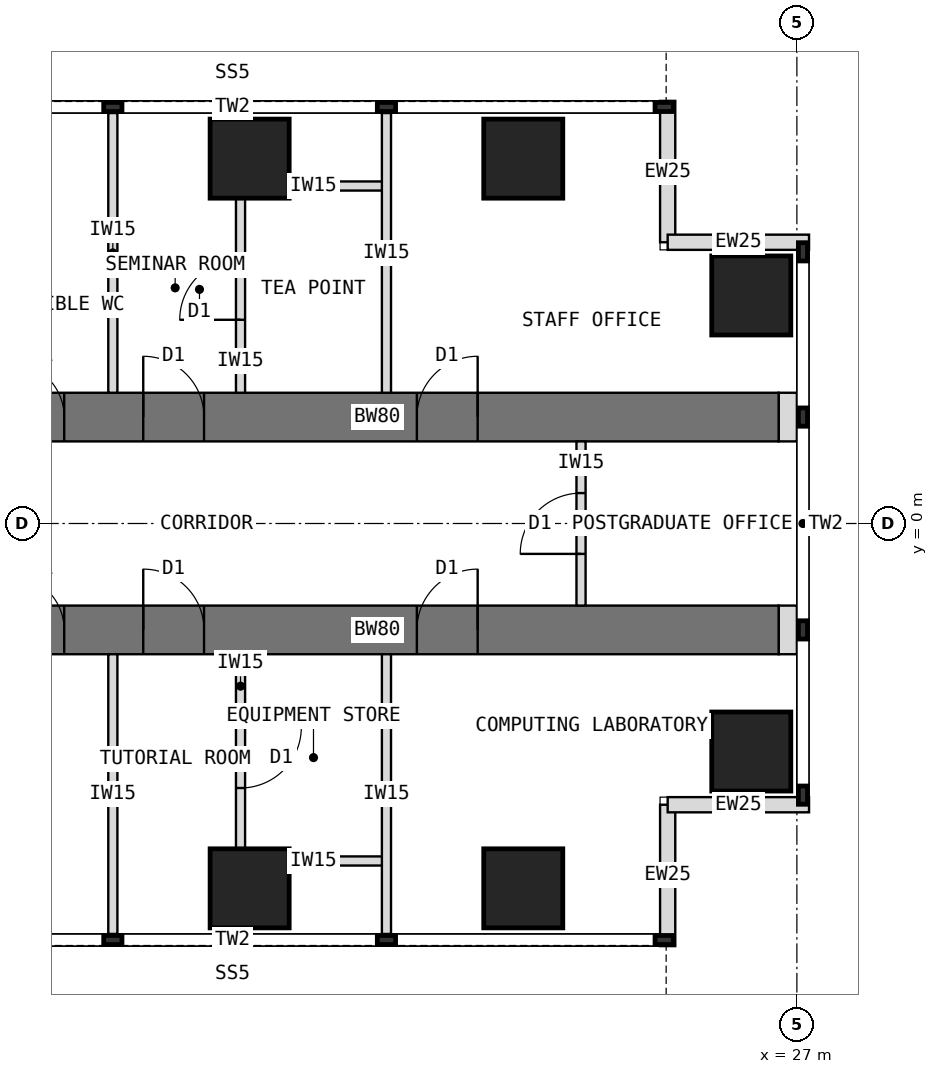
"""IFC4 building model, lengths in metres.
Left out: names, types, materials, properties, quantities, classifications, styles, units other than length and angle.
Written with IfcOpenShell. Run it as: python <this file> out.ifc"""

import sys

from ifc_helpers import new_model, si_unit, direction, frame, frame_2d, origin, origin_2d, place, context, subcontext, project, spatial, rectangle, extrude, element, fill, save


model = new_model("IFC4")
c1 = context("Model", 3, precision=1e-05, world=origin(), true_north=direction((0.0, 1.0)))
c2 = subcontext(c1, "Body", "Model", "MODEL_VIEW")
j1 = project(units=[si_unit("LENGTHUNIT", "METRE"), si_unit("PLANEANGLEUNIT", "RADIAN")], contexts=[c1])
p1 = place(None, origin())
s1 = spatial("IfcSite", under=j1, at=p1, CompositionType="ELEMENT")
p2 = place(p1, origin())
s2 = spatial("IfcBuilding", under=s1, at=p2, CompositionType="ELEMENT")
p3 = place(p2, frame((0.0, 0.0, 133.5)))
s3 = spatial("IfcBuildingStorey", under=s2, at=p3, CompositionType="ELEMENT", Elevation=133.5)
p4 = place(p3, frame((13.5, 1.75, 0.0), z_axis=(0.0, 0.0, 1.0), x_axis=(1.0, 0.0, 0.0)))
e1 = element("IfcWall", 1, at=p4, inside=s3, PredefinedType="SHEAR", context=c2, shape_type="SweptSolid", body=[
    extrude(rectangle(XDim=13.2, YDim=0.8, at=frame_2d((6.6, 0.0))), origin(), (0.0, 0.0, 1.0), 4.0),
])
p5 = place(p4, frame((0.55, 0.0, 0.0)))
e2 = element("IfcOpeningElement", 2, at=p5, cuts=e1, PredefinedType="OPENING", context=c2, shape_type="SweptSolid", body=[
    extrude(rectangle(XDim=0.9, YDim=2.1, at=frame_2d((0.45, 1.05))), frame((0.0, 0.41, 0.0), z_axis=(0.0, -1.0, 0.0), x_axis=(1.0, 0.0, 0.0)), (0.0, 0.0, 1.0), 0.82),
])
p6 = place(p4, frame((2.75, 0.0, 0.0)))
e3 = element("IfcOpeningElement", 3, at=p6, cuts=e1, PredefinedType="OPENING", context=c2, shape_type="SweptSolid", body=[
    extrude(rectangle(XDim=1.0, YDim=2.1, at=frame_2d((0.5, 1.05))), frame((0.0, 0.41, 0.0), z_axis=(0.0, -1.0, 0.0), x_axis=(1.0, 0.0, 0.0)), (0.0, 0.0, 1.0), 0.82),
])
p7 = place(p4, frame((7.25, 0.0, 0.0)))
e4 = element("IfcOpeningElement", 4, at=p7, cuts=e1, PredefinedType="OPENING", context=c2, shape_type="SweptSolid", body=[
    extrude(rectangle(XDim=1.0, YDim=2.1, at=frame_2d((0.5, 1.05))), frame((0.0, 0.41, 0.0), z_axis=(0.0, -1.0, 0.0), x_axis=(1.0, 0.0, 0.0)), (0.0, 0.0, 1.0), 0.82),
])
p8 = place(p3, frame((13.5, -1.75, 0.0), z_axis=(0.0, 0.0, 1.0), x_axis=(1.0, 0.0, 0.0)))
e5 = element("IfcWall", 5, at=p8, inside=s3, PredefinedType="SHEAR", context=c2, shape_type="SweptSolid", body=[
    extrude(rectangle(XDim=13.2, YDim=0.8, at=frame_2d((6.6, 0.0))), origin(), (0.0, 0.0, 1.0), 4.0),
])
p9 = place(p8, frame((0.55, 0.0, 0.0)))
e6 = element("IfcOpeningElement", 6, at=p9, cuts=e5, PredefinedType="OPENING", context=c2, shape_type="SweptSolid", body=[
    extrude(rectangle(XDim=0.9, YDim=2.1, at=frame_2d((0.45, 1.05))), frame((0.0, 0.41, 0.0), z_axis=(0.0, -1.0, 0.0), x_axis=(1.0, 0.0, 0.0)), (0.0, 0.0, 1.0), 0.82),
])
p10 = place(p8, frame((2.75, 0.0, 0.0)))
e7 = element("IfcOpeningElement", 7, at=p10, cuts=e5, PredefinedType="OPENING", context=c2, shape_type="SweptSolid", body=[
    extrude(rectangle(XDim=1.0, YDim=2.1, at=frame_2d((0.5, 1.05))), frame((0.0, 0.41, 0.0), z_axis=(0.0, -1.0, 0.0), x_axis=(1.0, 0.0, 0.0)), (0.0, 0.0, 1.0), 0.82),
])
p11 = place(p8, frame((7.25, 0.0, 0.0)))
e8 = element("IfcOpeningElement", 8, at=p11, cuts=e5, PredefinedType="OPENING", context=c2, shape_type="SweptSolid", body=[
    extrude(rectangle(XDim=1.0, YDim=2.1, at=frame_2d((0.5, 1.05))), frame((0.0, 0.41, 0.0), z_axis=(0.0, -1.0, 0.0), x_axis=(1.0, 0.0, 0.0)), (0.0, 0.0, 1.0), 0.82),
])
for number, where, z_axis, x_axis in (
    (9, (18.0, 6.0, 0.0), (0.0, 0.0, 1.0), (1.0, 0.0, 0.0)),
    (10, (18.0, -6.0, 0.0), (0.0, 0.0, 1.0), (1.0, 0.0, 0.0)),
    (11, (22.5, 6.0, 0.0), (0.0, 0.0, 1.0), (1.0, 0.0, 0.0)),
    (12, (22.5, -6.0, 0.0), (0.0, 0.0, 1.0), (1.0, 0.0, 0.0)),
    (13, (26.25, 3.75, 0.0), (0.0, 0.0, 1.0), (1.0, 0.0, 0.0)),
    (14, (26.25, -3.75, 0.0), (0.0, 0.0, 1.0), (1.0, 0.0, 0.0)),
):
    element("IfcColumn", number, at=place(p3, frame(where, z_axis=z_axis, x_axis=x_axis)), inside=s3, PredefinedType="COLUMN", context=c2, shape_type="SweptSolid", body=[
        extrude(rectangle(XDim=1.3, YDim=1.3, at=origin_2d()), origin(), (0.0, 0.0, 1.0), 4.0),
    ])
for number, where, z_axis, x_axis in (
    (15, (24.875, 6.95, 0.0), (0.0, 0.0, 1.0), (0.0, -1.0, 0.0)),
    (16, (24.875, 4.625, 0.0), (0.0, 0.0, 1.0), (1.0, 0.0, 0.0)),
    (17, (24.875, -6.95, 0.0), (0.0, 0.0, 1.0), (0.0, 1.0, 0.0)),
    (18, (24.875, -4.625, 0.0), (0.0, 0.0, 1.0), (1.0, 0.0, 0.0)),
):
    element("IfcWall", number, at=place(p3, frame(where, z_axis=z_axis, x_axis=x_axis)), inside=s3, PredefinedType="STANDARD", context=c2, shape_type="SweptSolid", body=[
        extrude(rectangle(XDim=2.325, YDim=0.25, at=frame_2d((1.163, 0.0))), origin(), (0.0, 0.0, 1.0), 3.8),
    ])
for number, where, z_axis, x_axis in (
    (19, (26.7, 1.75, 0.0), (0.0, 0.0, 1.0), (1.0, 0.0, 0.0)),
    (20, (26.7, -1.75, 0.0), (0.0, 0.0, 1.0), (1.0, 0.0, 0.0)),
):
    element("IfcWall", number, at=place(p3, frame(where, z_axis=z_axis, x_axis=x_axis)), inside=s3, PredefinedType="PARTITIONING", context=c2, shape_type="SweptSolid", body=[
        extrude(rectangle(XDim=0.3, YDim=0.8, at=frame_2d((0.15, 0.0))), origin(), (0.0, 0.0, 1.0), 3.8),
    ])
for number, where, z_axis, x_axis in (
    (21, (15.75, 2.15, 0.0), (0.0, 0.0, 1.0), (0.0, 1.0, 0.0)),
    (22, (20.25, 2.15, 0.0), (0.0, 0.0, 1.0), (0.0, 1.0, 0.0)),
):
    element("IfcWall", number, at=place(p3, frame(where, z_axis=z_axis, x_axis=x_axis)), inside=s3, PredefinedType="PARTITIONING", context=c2, shape_type="SweptSolid", body=[
        extrude(rectangle(XDim=4.6, YDim=0.15, at=frame_2d((2.3, 0.0))), origin(), (0.0, 0.0, 1.0), 3.8),
    ])
p12 = place(p3, frame((17.85, 5.55, 0.0), z_axis=(0.0, 0.0, 1.0), x_axis=(1.0, 0.0, 0.0)))
e23 = element("IfcWall", 23, at=p12, inside=s3, PredefinedType="PARTITIONING", context=c2, shape_type="SweptSolid", body=[
    extrude(rectangle(XDim=2.4, YDim=0.15, at=frame_2d((1.2, 0.0))), origin(), (0.0, 0.0, 1.0), 3.8),
])
p13 = place(p3, frame((17.85, 2.15, 0.0), z_axis=(0.0, 0.0, 1.0), x_axis=(0.0, 1.0, 0.0)))
e24 = element("IfcWall", 24, at=p13, inside=s3, PredefinedType="PARTITIONING", context=c2, shape_type="SweptSolid", body=[
    extrude(rectangle(XDim=3.4, YDim=0.15, at=frame_2d((1.7, 0.0))), origin(), (0.0, 0.0, 1.0), 3.8),
])
p14 = place(p13, frame((1.2, 0.0, 0.0)))
e25 = element("IfcOpeningElement", 25, at=p14, cuts=e24, PredefinedType="OPENING", context=c2, shape_type="SweptSolid", body=[
    extrude(rectangle(XDim=1.0, YDim=2.1, at=frame_2d((0.5, 1.05))), frame((0.0, 0.085, 0.0), z_axis=(0.0, -1.0, 0.0), x_axis=(1.0, 0.0, 0.0)), (0.0, 0.0, 1.0), 0.17),
])
for number, where, z_axis, x_axis in (
    (26, (15.75, -2.15, 0.0), (0.0, 0.0, 1.0), (0.0, -1.0, 0.0)),
    (27, (20.25, -2.15, 0.0), (0.0, 0.0, 1.0), (0.0, -1.0, 0.0)),
):
    element("IfcWall", number, at=place(p3, frame(where, z_axis=z_axis, x_axis=x_axis)), inside=s3, PredefinedType="PARTITIONING", context=c2, shape_type="SweptSolid", body=[
        extrude(rectangle(XDim=4.6, YDim=0.15, at=frame_2d((2.3, 0.0))), origin(), (0.0, 0.0, 1.0), 3.8),
    ])
p15 = place(p3, frame((17.85, -5.55, 0.0), z_axis=(0.0, 0.0, 1.0), x_axis=(1.0, 0.0, 0.0)))
e28 = element("IfcWall", 28, at=p15, inside=s3, PredefinedType="PARTITIONING", context=c2, shape_type="SweptSolid", body=[
    extrude(rectangle(XDim=2.4, YDim=0.15, at=frame_2d((1.2, 0.0))), origin(), (0.0, 0.0, 1.0), 3.8),
])
p16 = place(p3, frame((17.85, -2.15, 0.0), z_axis=(0.0, 0.0, 1.0), x_axis=(0.0, -1.0, 0.0)))
e29 = element("IfcWall", 29, at=p16, inside=s3, PredefinedType="PARTITIONING", context=c2, shape_type="SweptSolid", body=[
    extrude(rectangle(XDim=3.4, YDim=0.15, at=frame_2d((1.7, 0.0))), origin(), (0.0, 0.0, 1.0), 3.8),
])
p17 = place(p16, frame((1.2, 0.0, 0.0)))
e30 = element("IfcOpeningElement", 30, at=p17, cuts=e29, PredefinedType="OPENING", context=c2, shape_type="SweptSolid", body=[
    extrude(rectangle(XDim=1.0, YDim=2.1, at=frame_2d((0.5, 1.05))), frame((0.0, 0.085, 0.0), z_axis=(0.0, -1.0, 0.0), x_axis=(1.0, 0.0, 0.0)), (0.0, 0.0, 1.0), 0.17),
])
p18 = place(p3, frame((23.45, -1.35, 0.0), z_axis=(0.0, 0.0, 1.0), x_axis=(0.0, 1.0, 0.0)))
e31 = element("IfcWall", 31, at=p18, inside=s3, PredefinedType="PARTITIONING", context=c2, shape_type="SweptSolid", body=[
    extrude(rectangle(XDim=2.7, YDim=0.15, at=frame_2d((1.35, 0.0))), origin(), (0.0, 0.0, 1.0), 3.8),
])
p19 = place(p18, frame((0.85, 0.0, 0.0)))
e32 = element("IfcOpeningElement", 32, at=p19, cuts=e31, PredefinedType="OPENING", context=c2, shape_type="SweptSolid", body=[
    extrude(rectangle(XDim=1.0, YDim=2.1, at=frame_2d((0.5, 1.05))), frame((0.0, 0.085, 0.0), z_axis=(0.0, -1.0, 0.0), x_axis=(1.0, 0.0, 0.0)), (0.0, 0.0, 1.0), 0.17),
])
p20 = place(p14, origin())
e33 = element("IfcDoor", 33, at=p20, inside=s3, OperationType="SINGLE_SWING_LEFT", PredefinedType="DOOR", context=c2, shape_type="SweptSolid", body=[
    extrude(rectangle(XDim=1.0, YDim=2.1, at=frame_2d((0.5, 1.05))), frame((0.0, 0.025, 0.0), z_axis=(0.0, -1.0, 0.0), x_axis=(1.0, 0.0, 0.0)), (0.0, 0.0, 1.0), 0.05),
])
fill(e25, e33)
p21 = place(p17, origin())
e34 = element("IfcDoor", 34, at=p21, inside=s3, OperationType="SINGLE_SWING_LEFT", PredefinedType="DOOR", context=c2, shape_type="SweptSolid", body=[
    extrude(rectangle(XDim=1.0, YDim=2.1, at=frame_2d((0.5, 1.05))), frame((0.0, 0.025, 0.0), z_axis=(0.0, -1.0, 0.0), x_axis=(1.0, 0.0, 0.0)), (0.0, 0.0, 1.0), 0.05),
])
fill(e30, e34)
p22 = place(p19, origin())
e35 = element("IfcDoor", 35, at=p22, inside=s3, OperationType="SINGLE_SWING_LEFT", PredefinedType="DOOR", context=c2, shape_type="SweptSolid", body=[
    extrude(rectangle(XDim=1.0, YDim=2.1, at=frame_2d((0.5, 1.05))), frame((0.0, 0.025, 0.0), z_axis=(0.0, -1.0, 0.0), x_axis=(1.0, 0.0, 0.0)), (0.0, 0.0, 1.0), 0.05),
])
fill(e32, e35)
p23 = place(p5, origin())
e36 = element("IfcDoor", 36, at=p23, inside=s3, OperationType="SINGLE_SWING_LEFT", PredefinedType="DOOR", context=c2, shape_type="SweptSolid", body=[
    extrude(rectangle(XDim=0.82, YDim=2.06, at=frame_2d((0.45, 1.03))), frame((0.0, 0.025, 0.0), z_axis=(0.0, -1.0, 0.0), x_axis=(1.0, 0.0, 0.0)), (0.0, 0.0, 1.0), 0.05),
    extrude(rectangle(XDim=0.04, YDim=2.1, at=frame_2d((0.02, 1.05))), frame((0.0, 0.4, 0.0), z_axis=(0.0, -1.0, 0.0), x_axis=(1.0, 0.0, 0.0)), (0.0, 0.0, 1.0), 0.8),
    extrude(rectangle(XDim=0.04, YDim=2.1, at=frame_2d((0.88, 1.05))), frame((0.0, 0.4, 0.0), z_axis=(0.0, -1.0, 0.0), x_axis=(1.0, 0.0, 0.0)), (0.0, 0.0, 1.0), 0.8),
    extrude(rectangle(XDim=0.82, YDim=0.04, at=frame_2d((0.45, 2.08))), frame((0.0, 0.4, 0.0), z_axis=(0.0, -1.0, 0.0), x_axis=(1.0, 0.0, 0.0)), (0.0, 0.0, 1.0), 0.8),
])
fill(e2, e36)
p24 = place(p6, origin())
e37 = element("IfcDoor", 37, at=p24, inside=s3, OperationType="SINGLE_SWING_LEFT", PredefinedType="DOOR", context=c2, shape_type="SweptSolid", body=[
    extrude(rectangle(XDim=0.92, YDim=2.06, at=frame_2d((0.5, 1.03))), frame((0.0, 0.025, 0.0), z_axis=(0.0, -1.0, 0.0), x_axis=(1.0, 0.0, 0.0)), (0.0, 0.0, 1.0), 0.05),
    extrude(rectangle(XDim=0.04, YDim=2.1, at=frame_2d((0.02, 1.05))), frame((0.0, 0.4, 0.0), z_axis=(0.0, -1.0, 0.0), x_axis=(1.0, 0.0, 0.0)), (0.0, 0.0, 1.0), 0.8),
    extrude(rectangle(XDim=0.04, YDim=2.1, at=frame_2d((0.98, 1.05))), frame((0.0, 0.4, 0.0), z_axis=(0.0, -1.0, 0.0), x_axis=(1.0, 0.0, 0.0)), (0.0, 0.0, 1.0), 0.8),
    extrude(rectangle(XDim=0.92, YDim=0.04, at=frame_2d((0.5, 2.08))), frame((0.0, 0.4, 0.0), z_axis=(0.0, -1.0, 0.0), x_axis=(1.0, 0.0, 0.0)), (0.0, 0.0, 1.0), 0.8),
])
fill(e3, e37)
p25 = place(p7, origin())
e38 = element("IfcDoor", 38, at=p25, inside=s3, OperationType="SINGLE_SWING_RIGHT", PredefinedType="DOOR", context=c2, shape_type="SweptSolid", body=[
    extrude(rectangle(XDim=0.92, YDim=2.06, at=frame_2d((0.5, 1.03))), frame((0.0, 0.025, 0.0), z_axis=(0.0, -1.0, 0.0), x_axis=(1.0, 0.0, 0.0)), (0.0, 0.0, 1.0), 0.05),
    extrude(rectangle(XDim=0.04, YDim=2.1, at=frame_2d((0.02, 1.05))), frame((0.0, 0.4, 0.0), z_axis=(0.0, -1.0, 0.0), x_axis=(1.0, 0.0, 0.0)), (0.0, 0.0, 1.0), 0.8),
    extrude(rectangle(XDim=0.04, YDim=2.1, at=frame_2d((0.98, 1.05))), frame((0.0, 0.4, 0.0), z_axis=(0.0, -1.0, 0.0), x_axis=(1.0, 0.0, 0.0)), (0.0, 0.0, 1.0), 0.8),
    extrude(rectangle(XDim=0.92, YDim=0.04, at=frame_2d((0.5, 2.08))), frame((0.0, 0.4, 0.0), z_axis=(0.0, -1.0, 0.0), x_axis=(1.0, 0.0, 0.0)), (0.0, 0.0, 1.0), 0.8),
])
fill(e4, e38)
p26 = place(p9, origin())
e39 = element("IfcDoor", 39, at=p26, inside=s3, OperationType="SINGLE_SWING_LEFT", PredefinedType="DOOR", context=c2, shape_type="SweptSolid", body=[
    extrude(rectangle(XDim=0.82, YDim=2.06, at=frame_2d((0.45, 1.03))), frame((0.0, 0.025, 0.0), z_axis=(0.0, -1.0, 0.0), x_axis=(1.0, 0.0, 0.0)), (0.0, 0.0, 1.0), 0.05),
    extrude(rectangle(XDim=0.04, YDim=2.1, at=frame_2d((0.02, 1.05))), frame((0.0, 0.4, 0.0), z_axis=(0.0, -1.0, 0.0), x_axis=(1.0, 0.0, 0.0)), (0.0, 0.0, 1.0), 0.8),
    extrude(rectangle(XDim=0.04, YDim=2.1, at=frame_2d((0.88, 1.05))), frame((0.0, 0.4, 0.0), z_axis=(0.0, -1.0, 0.0), x_axis=(1.0, 0.0, 0.0)), (0.0, 0.0, 1.0), 0.8),
    extrude(rectangle(XDim=0.82, YDim=0.04, at=frame_2d((0.45, 2.08))), frame((0.0, 0.4, 0.0), z_axis=(0.0, -1.0, 0.0), x_axis=(1.0, 0.0, 0.0)), (0.0, 0.0, 1.0), 0.8),
])
fill(e6, e39)
p27 = place(p10, origin())
e40 = element("IfcDoor", 40, at=p27, inside=s3, OperationType="SINGLE_SWING_LEFT", PredefinedType="DOOR", context=c2, shape_type="SweptSolid", body=[
    extrude(rectangle(XDim=0.92, YDim=2.06, at=frame_2d((0.5, 1.03))), frame((0.0, 0.025, 0.0), z_axis=(0.0, -1.0, 0.0), x_axis=(1.0, 0.0, 0.0)), (0.0, 0.0, 1.0), 0.05),
    extrude(rectangle(XDim=0.04, YDim=2.1, at=frame_2d((0.02, 1.05))), frame((0.0, 0.4, 0.0), z_axis=(0.0, -1.0, 0.0), x_axis=(1.0, 0.0, 0.0)), (0.0, 0.0, 1.0), 0.8),
    extrude(rectangle(XDim=0.04, YDim=2.1, at=frame_2d((0.98, 1.05))), frame((0.0, 0.4, 0.0), z_axis=(0.0, -1.0, 0.0), x_axis=(1.0, 0.0, 0.0)), (0.0, 0.0, 1.0), 0.8),
    extrude(rectangle(XDim=0.92, YDim=0.04, at=frame_2d((0.5, 2.08))), frame((0.0, 0.4, 0.0), z_axis=(0.0, -1.0, 0.0), x_axis=(1.0, 0.0, 0.0)), (0.0, 0.0, 1.0), 0.8),
])
fill(e7, e40)
p28 = place(p11, origin())
e41 = element("IfcDoor", 41, at=p28, inside=s3, OperationType="SINGLE_SWING_RIGHT", PredefinedType="DOOR", context=c2, shape_type="SweptSolid", body=[
    extrude(rectangle(XDim=0.92, YDim=2.06, at=frame_2d((0.5, 1.03))), frame((0.0, 0.025, 0.0), z_axis=(0.0, -1.0, 0.0), x_axis=(1.0, 0.0, 0.0)), (0.0, 0.0, 1.0), 0.05),
    extrude(rectangle(XDim=0.04, YDim=2.1, at=frame_2d((0.02, 1.05))), frame((0.0, 0.4, 0.0), z_axis=(0.0, -1.0, 0.0), x_axis=(1.0, 0.0, 0.0)), (0.0, 0.0, 1.0), 0.8),
    extrude(rectangle(XDim=0.04, YDim=2.1, at=frame_2d((0.98, 1.05))), frame((0.0, 0.4, 0.0), z_axis=(0.0, -1.0, 0.0), x_axis=(1.0, 0.0, 0.0)), (0.0, 0.0, 1.0), 0.8),
    extrude(rectangle(XDim=0.92, YDim=0.04, at=frame_2d((0.5, 2.08))), frame((0.0, 0.4, 0.0), z_axis=(0.0, -1.0, 0.0), x_axis=(1.0, 0.0, 0.0)), (0.0, 0.0, 1.0), 0.8),
])
fill(e8, e41)
save(model, sys.argv[1])
